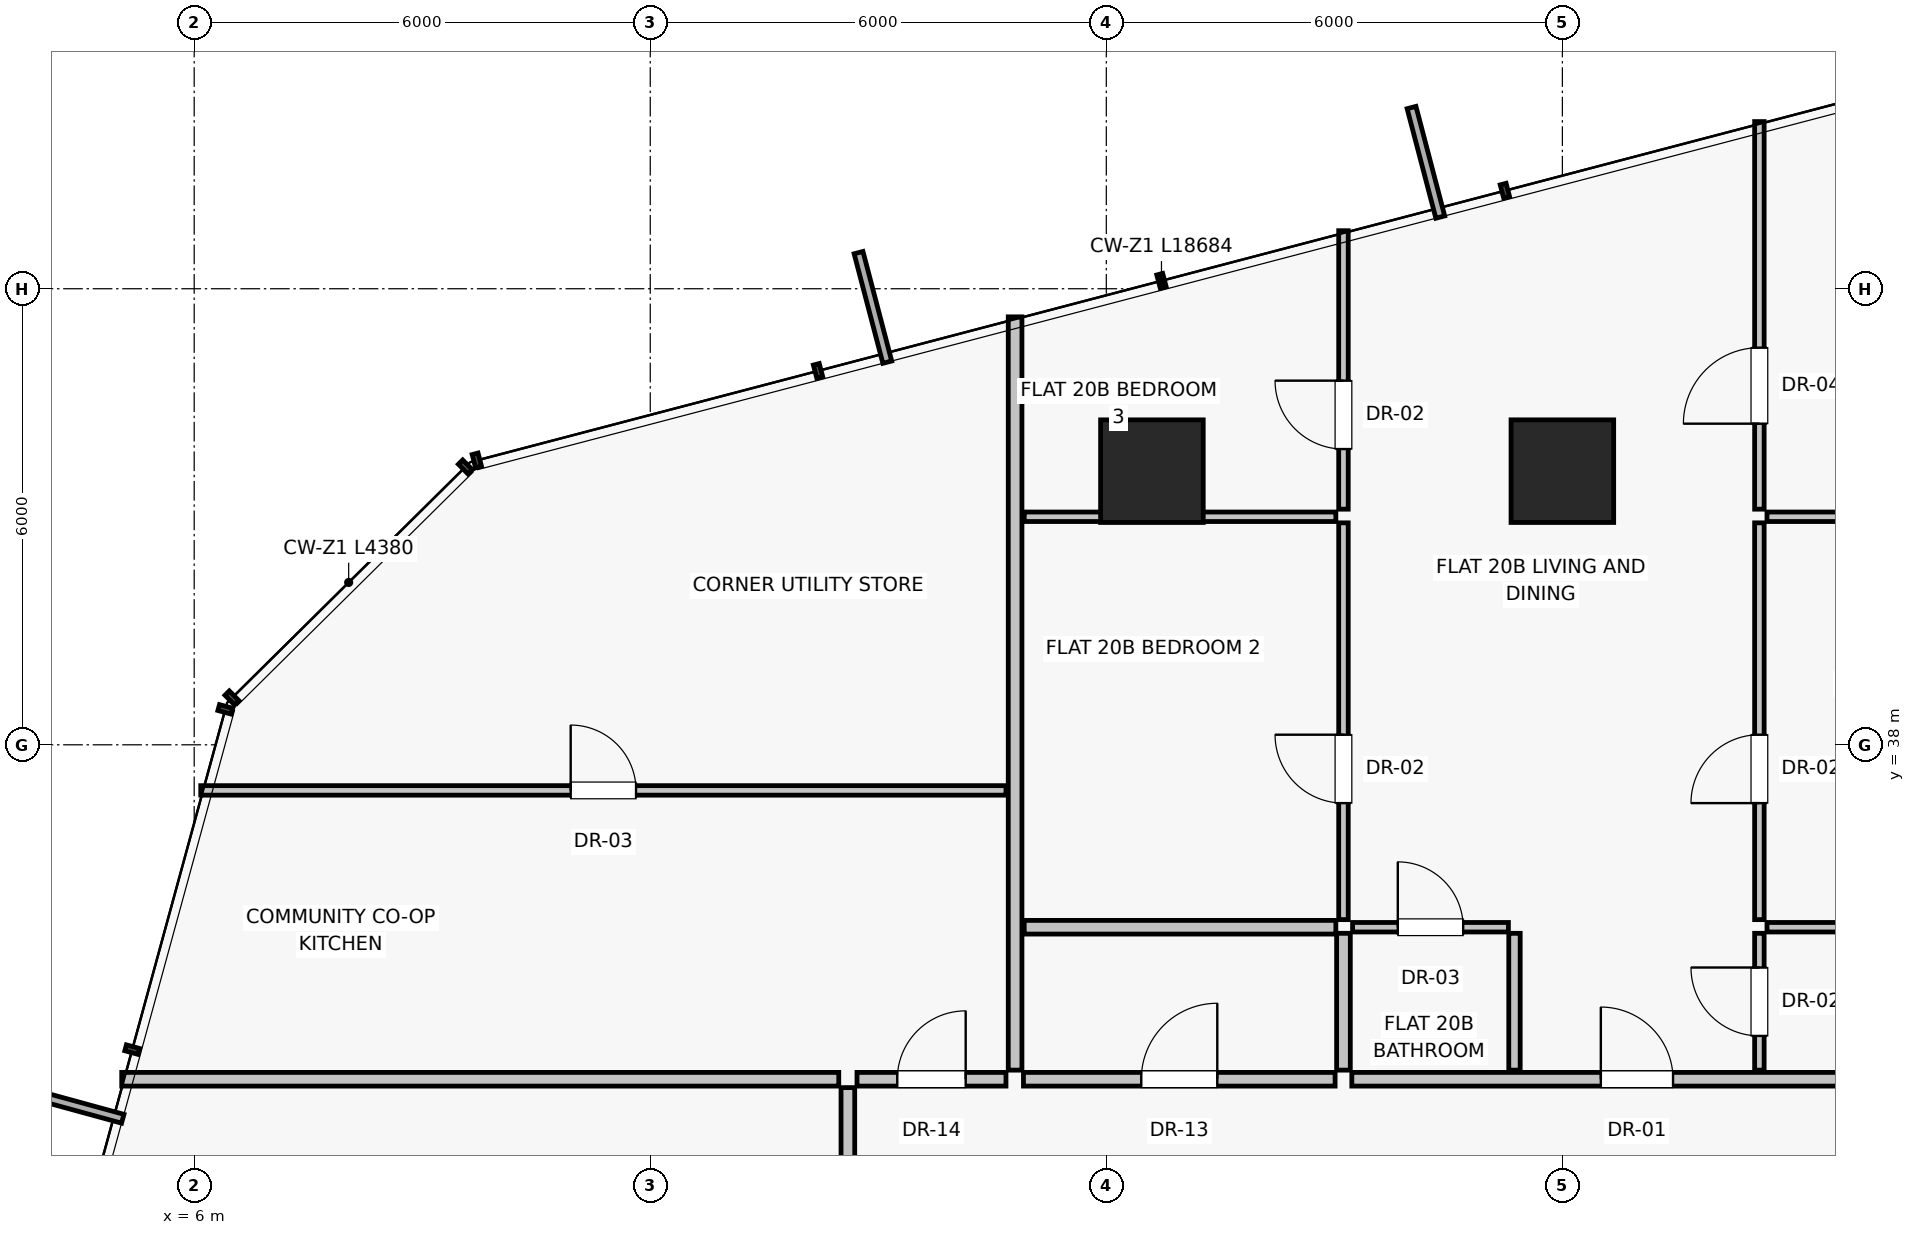
"""IFC4 building model, lengths in metres.
Left out: names, types, materials, properties, quantities, classifications, styles, units other than length and angle.
Written with IfcOpenShell. Run it as: python <this file> out.ifc"""

import sys

from ifc_helpers import new_model, si_unit, direction, frame, frame_2d, origin, origin_2d, place, context, subcontext, project, spatial, rectangle, extrude, source, transform, mapped, element, fill, save


model = new_model("IFC4")
c1 = context("Model", 3, precision=1e-05, world=origin(), true_north=direction((0.0, 1.0)))
c2 = subcontext(c1, "Body", "Model", "MODEL_VIEW")
j1 = project(units=[si_unit("LENGTHUNIT", "METRE"), si_unit("PLANEANGLEUNIT", "RADIAN")], contexts=[c1])
p1 = place(None, origin())
s1 = spatial("IfcSite", under=j1, at=p1, CompositionType="ELEMENT")
p2 = place(p1, origin())
s2 = spatial("IfcBuilding", under=s1, at=p2, CompositionType="ELEMENT")
p3 = place(p2, frame((0.0, 0.0, 73.85)))
s3 = spatial("IfcBuildingStorey", under=s2, at=p3, CompositionType="ELEMENT", Elevation=73.85)
for number, where, z_axis, x_axis in (
    (1, (24.0, 41.6, 0.0), (0.0, 0.0, 1.0), (1.0, 0.0, 0.0)),
    (2, (18.6, 41.6, 0.0), (0.0, 0.0, 1.0), (1.0, 0.0, 0.0)),
):
    element("IfcColumn", number, at=place(p3, frame(where, z_axis=z_axis, x_axis=x_axis)), inside=s3, PredefinedType="COLUMN", context=c2, shape_type="SweptSolid", body=[
        extrude(rectangle(XDim=1.35, YDim=1.35, at=origin_2d()), origin(), (0.0, 0.0, 1.0), 3.25),
    ])
p4 = place(p3, frame((16.8, 33.72, 0.0), z_axis=(0.0, 0.0, 1.0), x_axis=(0.0, 1.0, 0.0)))
e3 = element("IfcWall", 3, at=p4, inside=s3, PredefinedType="PARTITIONING", context=c2, shape_type="SweptSolid", body=[
    extrude(rectangle(XDim=9.91, YDim=0.18, at=frame_2d((4.955, 0.0))), origin(), (0.0, 0.0, 1.0), 3.0),
])
p5 = place(p3, frame((16.91, 33.6, 0.0), z_axis=(0.0, 0.0, 1.0), x_axis=(1.0, 0.0, 0.0)))
e4 = element("IfcWall", 4, at=p5, inside=s3, PredefinedType="PARTITIONING", context=c2, shape_type="SweptSolid", body=[
    extrude(rectangle(XDim=4.1, YDim=0.18, at=frame_2d((2.05, 0.0))), origin(), (0.0, 0.0, 1.0), 3.0),
])
p6 = place(p5, frame((1.55, 0.0, 0.0)))
e5 = element("IfcOpeningElement", 5, at=p6, cuts=e4, PredefinedType="OPENING", context=c2, shape_type="SweptSolid", body=[
    extrude(rectangle(XDim=1.0, YDim=2.01, at=frame_2d((0.5, 1.005))), frame((0.0, 0.1, 0.0), z_axis=(0.0, -1.0, 0.0), x_axis=(1.0, 0.0, 0.0)), (0.0, 0.0, 1.0), 0.2),
])
p7 = place(p3, frame((21.23, 33.6, 0.0), z_axis=(0.0, 0.0, 1.0), x_axis=(1.0, 0.0, 0.0)))
e6 = element("IfcWall", 6, at=p7, inside=s3, PredefinedType="PARTITIONING", context=c2, shape_type="SweptSolid", body=[
    extrude(rectangle(XDim=9.86, YDim=0.18, at=frame_2d((4.93, 0.0))), origin(), (0.0, 0.0, 1.0), 3.0),
])
p8 = place(p7, frame((3.276, 0.0, 0.0)))
e7 = element("IfcOpeningElement", 7, at=p8, cuts=e6, PredefinedType="OPENING", context=c2, shape_type="SweptSolid", body=[
    extrude(rectangle(XDim=0.95, YDim=2.02, at=frame_2d((0.475, 1.01))), frame((0.0, 0.1, 0.0), z_axis=(0.0, -1.0, 0.0), x_axis=(1.0, 0.0, 0.0)), (0.0, 0.0, 1.0), 0.2),
])
p9 = place(p3, frame((16.92, 41.0, 0.0), z_axis=(0.0, 0.0, 1.0), x_axis=(1.0, 0.0, 0.0)))
e8 = element("IfcWall", 8, at=p9, inside=s3, PredefinedType="PARTITIONING", context=c2, shape_type="SweptSolid", body=[
    extrude(rectangle(XDim=4.1, YDim=0.125, at=frame_2d((2.05, 0.0))), origin(), (0.0, 0.0, 1.0), 2.1),
])
p10 = place(p3, frame((21.12, 41.1, 0.0), z_axis=(0.0, 0.0, 1.0), x_axis=(0.0, 1.0, 0.0)))
e9 = element("IfcWall", 9, at=p10, inside=s3, PredefinedType="PARTITIONING", context=c2, shape_type="SweptSolid", body=[
    extrude(rectangle(XDim=3.663, YDim=0.125, at=frame_2d((1.832, 0.0))), origin(), (0.0, 0.0, 1.0), 3.0),
])
p11 = place(p10, frame((0.791, 0.0, 0.0)))
e10 = element("IfcOpeningElement", 10, at=p11, cuts=e9, PredefinedType="OPENING", context=c2, shape_type="SweptSolid", body=[
    extrude(rectangle(XDim=0.9, YDim=2.01, at=frame_2d((0.45, 1.005))), frame((0.0, 0.073, 0.0), z_axis=(0.0, -1.0, 0.0), x_axis=(1.0, 0.0, 0.0)), (0.0, 0.0, 1.0), 0.145),
])
p12 = place(p3, frame((26.692, 41.0, 0.0), z_axis=(0.0, 0.0, 1.0), x_axis=(1.0, 0.0, 0.0)))
e11 = element("IfcWall", 11, at=p12, inside=s3, PredefinedType="PARTITIONING", context=c2, shape_type="SweptSolid", body=[
    extrude(rectangle(XDim=4.388, YDim=0.125, at=frame_2d((2.194, 0.0))), origin(), (0.0, 0.0, 1.0), 2.1),
])
p13 = place(p3, frame((26.592, 41.1, 0.0), z_axis=(0.0, 0.0, 1.0), x_axis=(0.0, 1.0, 0.0)))
e12 = element("IfcWall", 12, at=p13, inside=s3, PredefinedType="PARTITIONING", context=c2, shape_type="SweptSolid", body=[
    extrude(rectangle(XDim=5.099, YDim=0.125, at=frame_2d((2.549, 0.0))), origin(), (0.0, 0.0, 1.0), 3.0),
])
p14 = place(p13, frame((1.125, 0.0, 0.0)))
e13 = element("IfcOpeningElement", 13, at=p14, cuts=e12, PredefinedType="OPENING", context=c2, shape_type="SweptSolid", body=[
    extrude(rectangle(XDim=1.0, YDim=2.01, at=frame_2d((0.5, 1.005))), frame((0.0, 0.073, 0.0), z_axis=(0.0, -1.0, 0.0), x_axis=(1.0, 0.0, 0.0)), (0.0, 0.0, 1.0), 0.145),
])
p15 = place(p3, frame((16.92, 35.6, 0.0), z_axis=(0.0, 0.0, 1.0), x_axis=(1.0, 0.0, 0.0)))
e14 = element("IfcWall", 14, at=p15, inside=s3, PredefinedType="PARTITIONING", context=c2, shape_type="SweptSolid", body=[
    extrude(rectangle(XDim=4.1, YDim=0.18, at=frame_2d((2.05, 0.0))), origin(), (0.0, 0.0, 1.0), 3.0),
])
p16 = place(p3, frame((21.12, 33.72, 0.0), z_axis=(0.0, 0.0, 1.0), x_axis=(0.0, 1.0, 0.0)))
e15 = element("IfcWall", 15, at=p16, inside=s3, PredefinedType="PARTITIONING", context=c2, shape_type="SweptSolid", body=[
    extrude(rectangle(XDim=1.8, YDim=0.18, at=frame_2d((0.9, 0.0))), origin(), (0.0, 0.0, 1.0), 3.0),
])
p17 = place(p3, frame((21.12, 35.7, 0.0), z_axis=(0.0, 0.0, 1.0), x_axis=(0.0, 1.0, 0.0)))
e16 = element("IfcWall", 16, at=p17, inside=s3, PredefinedType="PARTITIONING", context=c2, shape_type="SweptSolid", body=[
    extrude(rectangle(XDim=5.22, YDim=0.125, at=frame_2d((2.61, 0.0))), origin(), (0.0, 0.0, 1.0), 3.0),
])
p18 = place(p17, frame((1.533, 0.0, 0.0)))
e17 = element("IfcOpeningElement", 17, at=p18, cuts=e16, PredefinedType="OPENING", context=c2, shape_type="SweptSolid", body=[
    extrude(rectangle(XDim=0.9, YDim=2.01, at=frame_2d((0.45, 1.005))), frame((0.0, 0.073, 0.0), z_axis=(0.0, -1.0, 0.0), x_axis=(1.0, 0.0, 0.0)), (0.0, 0.0, 1.0), 0.145),
])
p19 = place(p3, frame((23.37, 33.72, 0.0), z_axis=(0.0, 0.0, 1.0), x_axis=(0.0, 1.0, 0.0)))
e18 = element("IfcWall", 18, at=p19, inside=s3, PredefinedType="PARTITIONING", context=c2, shape_type="SweptSolid", body=[
    extrude(rectangle(XDim=1.8, YDim=0.15, at=frame_2d((0.9, 0.0))), origin(), (0.0, 0.0, 1.0), 3.0),
])
p20 = place(p3, frame((21.24, 35.6, 0.0), z_axis=(0.0, 0.0, 1.0), x_axis=(1.0, 0.0, 0.0)))
e19 = element("IfcWall", 19, at=p20, inside=s3, PredefinedType="PARTITIONING", context=c2, shape_type="SweptSolid", body=[
    extrude(rectangle(XDim=2.05, YDim=0.125, at=frame_2d((1.025, 0.0))), origin(), (0.0, 0.0, 1.0), 3.0),
])
p21 = place(p20, frame((0.595, 0.0, 0.0)))
e20 = element("IfcOpeningElement", 20, at=p21, cuts=e19, PredefinedType="OPENING", context=c2, shape_type="SweptSolid", body=[
    extrude(rectangle(XDim=0.86, YDim=2.01, at=frame_2d((0.43, 1.005))), frame((0.0, 0.073, 0.0), z_axis=(0.0, -1.0, 0.0), x_axis=(1.0, 0.0, 0.0)), (0.0, 0.0, 1.0), 0.145),
])
p22 = place(p3, frame((26.592, 33.72, 0.0), z_axis=(0.0, 0.0, 1.0), x_axis=(0.0, 1.0, 0.0)))
e21 = element("IfcWall", 21, at=p22, inside=s3, PredefinedType="PARTITIONING", context=c2, shape_type="SweptSolid", body=[
    extrude(rectangle(XDim=1.8, YDim=0.125, at=frame_2d((0.9, 0.0))), origin(), (0.0, 0.0, 1.0), 3.0),
])
p23 = place(p22, frame((0.45, 0.0, 0.0)))
e22 = element("IfcOpeningElement", 22, at=p23, cuts=e21, PredefinedType="OPENING", context=c2, shape_type="SweptSolid", body=[
    extrude(rectangle(XDim=0.9, YDim=2.01, at=frame_2d((0.45, 1.005))), frame((0.0, 0.073, 0.0), z_axis=(0.0, -1.0, 0.0), x_axis=(1.0, 0.0, 0.0)), (0.0, 0.0, 1.0), 0.145),
])
p24 = place(p3, frame((26.692, 35.6, 0.0), z_axis=(0.0, 0.0, 1.0), x_axis=(1.0, 0.0, 0.0)))
e23 = element("IfcWall", 23, at=p24, inside=s3, PredefinedType="PARTITIONING", context=c2, shape_type="SweptSolid", body=[
    extrude(rectangle(XDim=4.388, YDim=0.125, at=frame_2d((2.194, 0.0))), origin(), (0.0, 0.0, 1.0), 3.0),
])
p25 = place(p3, frame((26.592, 35.7, 0.0), z_axis=(0.0, 0.0, 1.0), x_axis=(0.0, 1.0, 0.0)))
e24 = element("IfcWall", 24, at=p25, inside=s3, PredefinedType="PARTITIONING", context=c2, shape_type="SweptSolid", body=[
    extrude(rectangle(XDim=5.22, YDim=0.125, at=frame_2d((2.61, 0.0))), origin(), (0.0, 0.0, 1.0), 3.0),
])
p26 = place(p25, frame((1.533, 0.0, 0.0)))
e25 = element("IfcOpeningElement", 25, at=p26, cuts=e24, PredefinedType="OPENING", context=c2, shape_type="SweptSolid", body=[
    extrude(rectangle(XDim=0.9, YDim=2.01, at=frame_2d((0.45, 1.005))), frame((0.0, 0.073, 0.0), z_axis=(0.0, -1.0, 0.0), x_axis=(1.0, 0.0, 0.0)), (0.0, 0.0, 1.0), 0.145),
])
p27 = place(p3, frame((14.48, 33.6, 0.0), z_axis=(0.0, 0.0, 1.0), x_axis=(-1.0, 0.0, 0.0)))
e26 = element("IfcWall", 26, at=p27, inside=s3, PredefinedType="PARTITIONING", context=c2, shape_type="SweptSolid", body=[
    extrude(rectangle(XDim=9.433, YDim=0.18, at=frame_2d((4.717, 0.0))), origin(), (0.0, 0.0, 1.0), 3.0),
])
p28 = place(p3, frame((14.6, 24.11, 0.0), z_axis=(0.0, 0.0, 1.0), x_axis=(0.0, 1.0, 0.0)))
e27 = element("IfcWall", 27, at=p28, inside=s3, PredefinedType="PARTITIONING", context=c2, shape_type="SweptSolid", body=[
    extrude(rectangle(XDim=9.38, YDim=0.18, at=frame_2d((4.69, 0.0))), origin(), (0.0, 0.0, 1.0), 3.0),
])
p29 = place(p28, frame((4.19, 0.0, 0.0)))
e28 = element("IfcOpeningElement", 28, at=p29, cuts=e27, PredefinedType="OPENING", context=c2, shape_type="SweptSolid", body=[
    extrude(rectangle(XDim=1.0, YDim=2.01, at=frame_2d((0.5, 1.005))), frame((0.0, 0.1, 0.0), z_axis=(0.0, -1.0, 0.0), x_axis=(1.0, 0.0, 0.0)), (0.0, 0.0, 1.0), 0.2),
])
p30 = place(p3, frame((14.72, 33.6, 0.0), z_axis=(0.0, 0.0, 1.0), x_axis=(1.0, 0.0, 0.0)))
e29 = element("IfcWall", 29, at=p30, inside=s3, PredefinedType="PARTITIONING", context=c2, shape_type="SweptSolid", body=[
    extrude(rectangle(XDim=1.96, YDim=0.18, at=frame_2d((0.98, 0.0))), origin(), (0.0, 0.0, 1.0), 3.0),
])
p31 = place(p30, frame((0.53, 0.0, 0.0)))
e30 = element("IfcOpeningElement", 30, at=p31, cuts=e29, PredefinedType="OPENING", context=c2, shape_type="SweptSolid", body=[
    extrude(rectangle(XDim=0.9, YDim=2.01, at=frame_2d((0.45, 1.005))), frame((0.0, 0.1, 0.0), z_axis=(0.0, -1.0, 0.0), x_axis=(1.0, 0.0, 0.0)), (0.0, 0.0, 1.0), 0.2),
])
p32 = place(p3, frame((6.086, 37.4, 0.0), z_axis=(0.0, 0.0, 1.0), x_axis=(1.0, 0.0, 0.0)))
e31 = element("IfcWall", 31, at=p32, inside=s3, PredefinedType="PARTITIONING", context=c2, shape_type="SweptSolid", body=[
    extrude(rectangle(XDim=10.594, YDim=0.125, at=frame_2d((5.297, 0.0))), origin(), (0.0, 0.0, 1.0), 3.0),
])
p33 = place(p32, frame((4.867, 0.0, 0.0)))
e32 = element("IfcOpeningElement", 32, at=p33, cuts=e31, PredefinedType="OPENING", context=c2, shape_type="SweptSolid", body=[
    extrude(rectangle(XDim=0.86, YDim=2.01, at=frame_2d((0.43, 1.005))), frame((0.0, 0.073, 0.0), z_axis=(0.0, -1.0, 0.0), x_axis=(1.0, 0.0, 0.0)), (0.0, 0.0, 1.0), 0.145),
])
m1 = source(origin(), c2, "Body", "SweptSolid", [
    extrude(rectangle(XDim=1.0, YDim=2.01, at=frame_2d((0.5, 1.005))), frame((0.0, 0.025, 0.0), z_axis=(0.0, -1.0, 0.0), x_axis=(1.0, 0.0, 0.0)), (0.0, 0.0, 1.0), 0.05),
])
p34 = place(p6, origin())
e33 = element("IfcDoor", 33, at=p34, inside=s3, OperationType="SINGLE_SWING_RIGHT", PredefinedType="DOOR", context=c2, shape_type="MappedRepresentation", body=[
    mapped(m1, transform((0.0, 0.0, 0.0), scale=1.0)),
])
fill(e5, e33)
m2 = source(origin(), c2, "Body", "SweptSolid", [
    extrude(rectangle(XDim=0.95, YDim=2.02, at=frame_2d((0.475, 1.01))), frame((0.0, 0.025, 0.0), z_axis=(0.0, -1.0, 0.0), x_axis=(1.0, 0.0, 0.0)), (0.0, 0.0, 1.0), 0.05),
])
p35 = place(p8, origin())
e34 = element("IfcDoor", 34, at=p35, inside=s3, OperationType="SINGLE_SWING_LEFT", PredefinedType="DOOR", context=c2, shape_type="MappedRepresentation", body=[
    mapped(m2, transform((0.0, 0.0, 0.0), scale=1.0)),
])
fill(e7, e34)
m3 = source(origin(), c2, "Body", "SweptSolid", [
    extrude(rectangle(XDim=0.9, YDim=2.01, at=frame_2d((0.45, 1.005))), frame((0.0, 0.025, 0.0), z_axis=(0.0, -1.0, 0.0), x_axis=(1.0, 0.0, 0.0)), (0.0, 0.0, 1.0), 0.05),
])
p36 = place(p11, origin())
e35 = element("IfcDoor", 35, at=p36, inside=s3, OperationType="SINGLE_SWING_RIGHT", PredefinedType="DOOR", context=c2, shape_type="MappedRepresentation", body=[
    mapped(m3, transform((0.0, 0.0, 0.0), scale=1.0)),
])
fill(e10, e35)
p37 = place(p14, origin())
e36 = element("IfcDoor", 36, at=p37, inside=s3, OperationType="SINGLE_SWING_LEFT", PredefinedType="DOOR", context=c2, shape_type="MappedRepresentation", body=[
    mapped(m1, transform((0.0, 0.0, 0.0), scale=1.0)),
])
fill(e13, e36)
p38 = place(p18, origin())
e37 = element("IfcDoor", 37, at=p38, inside=s3, OperationType="SINGLE_SWING_RIGHT", PredefinedType="DOOR", context=c2, shape_type="MappedRepresentation", body=[
    mapped(m3, transform((0.0, 0.0, 0.0), scale=1.0)),
])
fill(e17, e37)
m4 = source(origin(), c2, "Body", "SweptSolid", [
    extrude(rectangle(XDim=0.86, YDim=2.01, at=frame_2d((0.43, 1.005))), frame((0.0, 0.025, 0.0), z_axis=(0.0, -1.0, 0.0), x_axis=(1.0, 0.0, 0.0)), (0.0, 0.0, 1.0), 0.05),
])
p39 = place(p21, origin())
e38 = element("IfcDoor", 38, at=p39, inside=s3, OperationType="SINGLE_SWING_LEFT", PredefinedType="DOOR", context=c2, shape_type="MappedRepresentation", body=[
    mapped(m4, transform((0.0, 0.0, 0.0), scale=1.0)),
])
fill(e20, e38)
p40 = place(p23, origin())
e39 = element("IfcDoor", 39, at=p40, inside=s3, OperationType="SINGLE_SWING_RIGHT", PredefinedType="DOOR", context=c2, shape_type="MappedRepresentation", body=[
    mapped(m3, transform((0.0, 0.0, 0.0), scale=1.0)),
])
fill(e22, e39)
p41 = place(p26, origin())
e40 = element("IfcDoor", 40, at=p41, inside=s3, OperationType="SINGLE_SWING_LEFT", PredefinedType="DOOR", context=c2, shape_type="MappedRepresentation", body=[
    mapped(m3, transform((0.0, 0.0, 0.0), scale=1.0)),
])
fill(e25, e40)
p42 = place(p31, origin())
e41 = element("IfcDoor", 41, at=p42, inside=s3, OperationType="SINGLE_SWING_RIGHT", PredefinedType="DOOR", context=c2, shape_type="MappedRepresentation", body=[
    mapped(m3, transform((0.0, 0.0, 0.0), scale=1.0)),
])
fill(e30, e41)
p43 = place(p33, origin())
e42 = element("IfcDoor", 42, at=p43, inside=s3, OperationType="SINGLE_SWING_LEFT", PredefinedType="DOOR", context=c2, shape_type="MappedRepresentation", body=[
    mapped(m4, transform((0.0, 0.0, 0.0), scale=1.0)),
])
fill(e32, e42)
save(model, sys.argv[1])
